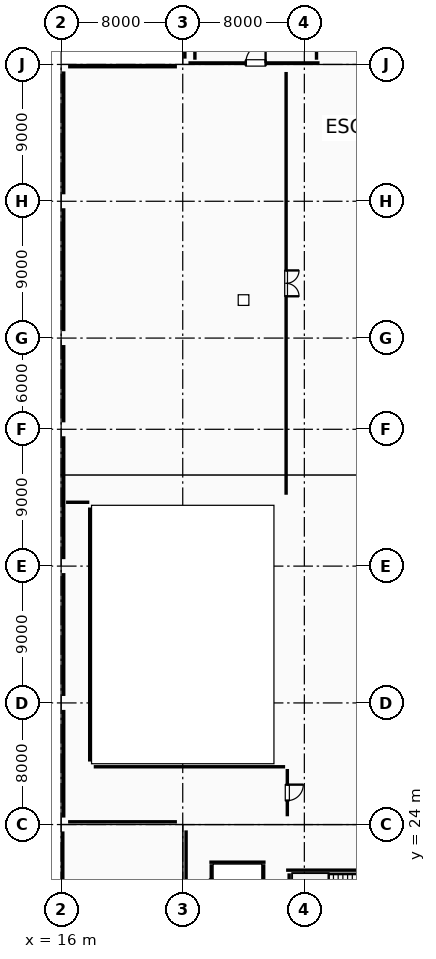
"""IFC4 building model, lengths in metres.
Left out: names, types, materials, properties, quantities, classifications, styles, units other than length and angle.
Written with IfcOpenShell. Run it as: python <this file> out.ifc"""

import sys

from ifc_helpers import new_model, si_unit, direction, frame, frame_2d, origin, origin_2d, place, context, subcontext, project, spatial, rectangle, extrude, element, fill, save


model = new_model("IFC4")
c1 = context("Model", 3, precision=1e-05, world=origin(), true_north=direction((0.0, 1.0)))
c2 = subcontext(c1, "Body", "Model", "MODEL_VIEW")
j1 = project(units=[si_unit("LENGTHUNIT", "METRE"), si_unit("PLANEANGLEUNIT", "RADIAN")], contexts=[c1])
p1 = place(None, origin())
s1 = spatial("IfcSite", under=j1, at=p1, CompositionType="ELEMENT")
p2 = place(p1, origin())
s2 = spatial("IfcBuilding", under=s1, at=p2, CompositionType="ELEMENT")
p3 = place(p2, frame((0.0, 0.0, 15.0)))
s3 = spatial("IfcBuildingStorey", under=s2, at=p3, CompositionType="ELEMENT", Elevation=15.0)
for number, where, z_axis, x_axis in (
    (1, (16.0, 24.0, 0.0), (0.0, 0.0, 1.0), (1.0, 0.0, 0.0)),
    (2, (16.0, 32.0, 0.0), (0.0, 0.0, 1.0), (1.0, 0.0, 0.0)),
    (3, (16.0, 41.0, 0.0), (0.0, 0.0, 1.0), (1.0, 0.0, 0.0)),
    (4, (16.0, 50.0, 0.0), (0.0, 0.0, 1.0), (1.0, 0.0, 0.0)),
    (5, (16.0, 56.0, 0.0), (0.0, 0.0, 1.0), (1.0, 0.0, 0.0)),
    (6, (16.0, 65.0, 0.0), (0.0, 0.0, 1.0), (1.0, 0.0, 0.0)),
    (7, (16.0, 74.0, 0.0), (0.0, 0.0, 1.0), (1.0, 0.0, 0.0)),
):
    element("IfcColumn", number, at=place(p3, frame(where, z_axis=z_axis, x_axis=x_axis)), inside=s3, PredefinedType="COLUMN", context=c2, shape_type="SweptSolid", body=[
        extrude(rectangle(XDim=0.9, YDim=0.9, at=origin_2d()), origin(), (0.0, 0.0, 1.0), 4.8),
    ])
for number, where, z_axis, x_axis in (
    (8, (24.0, 24.0, 0.0), (0.0, 0.0, 1.0), (1.0, 0.0, 0.0)),
    (9, (24.0, 50.0, 0.0), (0.0, 0.0, 1.0), (1.0, 0.0, 0.0)),
    (10, (24.0, 56.0, 0.0), (0.0, 0.0, 1.0), (1.0, 0.0, 0.0)),
    (11, (24.0, 65.0, 0.0), (0.0, 0.0, 1.0), (1.0, 0.0, 0.0)),
    (12, (24.0, 74.0, 0.0), (0.0, 0.0, 1.0), (1.0, 0.0, 0.0)),
    (13, (32.0, 24.0, 0.0), (0.0, 0.0, 1.0), (1.0, 0.0, 0.0)),
    (14, (32.0, 50.0, 0.0), (0.0, 0.0, 1.0), (1.0, 0.0, 0.0)),
    (15, (32.0, 56.0, 0.0), (0.0, 0.0, 1.0), (1.0, 0.0, 0.0)),
    (16, (32.0, 65.0, 0.0), (0.0, 0.0, 1.0), (1.0, 0.0, 0.0)),
):
    element("IfcColumn", number, at=place(p3, frame(where, z_axis=z_axis, x_axis=x_axis)), inside=s3, PredefinedType="COLUMN", context=c2, shape_type="SweptSolid", body=[
        extrude(rectangle(XDim=0.75, YDim=0.75, at=origin_2d()), origin(), (0.0, 0.0, 1.0), 4.8),
    ])
p4 = place(p3, frame((16.458, 73.85, 0.0), z_axis=(0.0, 0.0, 1.0), x_axis=(1.0, 0.0, 0.0)))
e17 = element("IfcWall", 17, at=p4, inside=s3, PredefinedType="ELEMENTEDWALL", context=c2, shape_type="SweptSolid", body=[
    extrude(rectangle(XDim=7.159, YDim=0.26, at=frame_2d((3.58, 0.0))), origin(), (0.0, 0.0, 1.0), 3.985),
])
p5 = place(p4, frame((3.03, 0.0, 0.95)))
e18 = element("IfcOpeningElement", 18, at=p5, cuts=e17, PredefinedType="OPENING", context=c2, shape_type="SweptSolid", body=[
    extrude(rectangle(XDim=1.1, YDim=1.8, at=frame_2d((0.55, 0.9))), frame((0.0, 0.14, 0.0), z_axis=(0.0, -1.0, 0.0), x_axis=(1.0, 0.0, 0.0)), (0.0, 0.0, 1.0), 0.28),
])
p6 = place(p3, frame((24.14, 74.383, 0.0), z_axis=(0.0, 0.0, 1.0), x_axis=(0.0, 1.0, 0.0)))
e19 = element("IfcWall", 19, at=p6, inside=s3, PredefinedType="ELEMENTEDWALL", context=c2, shape_type="SweptSolid", body=[
    extrude(rectangle(XDim=8.284, YDim=0.24, at=frame_2d((4.142, 0.0))), origin(), (0.0, 0.0, 1.0), 3.985),
])
p7 = place(p6, frame((3.592, 0.0, 0.95)))
e20 = element("IfcOpeningElement", 20, at=p7, cuts=e19, PredefinedType="OPENING", context=c2, shape_type="SweptSolid", body=[
    extrude(rectangle(XDim=1.1, YDim=2.1, at=frame_2d((0.55, 1.05))), frame((0.0, 0.13, 0.0), z_axis=(0.0, -1.0, 0.0), x_axis=(1.0, 0.0, 0.0)), (0.0, 0.0, 1.0), 0.26),
])
p8 = place(p3, frame((24.22, 8.21, 0.0), z_axis=(0.0, 0.0, 1.0), x_axis=(0.0, 1.0, 0.0)))
e21 = element("IfcWall", 21, at=p8, inside=s3, PredefinedType="STANDARD", context=c2, shape_type="SweptSolid", body=[
    extrude(rectangle(XDim=15.407, YDim=0.4, at=frame_2d((7.704, 0.0))), origin(), (0.0, 0.0, 1.0), 4.55),
])
p9 = place(p8, frame((7.003, 0.0, 0.95)))
e22 = element("IfcOpeningElement", 22, at=p9, cuts=e21, PredefinedType="OPENING", context=c2, shape_type="SweptSolid", body=[
    extrude(rectangle(XDim=1.4, YDim=2.1, at=frame_2d((0.7, 1.05))), frame((0.0, 0.21, 0.0), z_axis=(0.0, -1.0, 0.0), x_axis=(1.0, 0.0, 0.0)), (0.0, 0.0, 1.0), 0.42),
])
p10 = place(p3, frame((23.617, 24.18, 0.0), z_axis=(0.0, 0.0, 1.0), x_axis=(-1.0, 0.0, 0.0)))
e23 = element("IfcWall", 23, at=p10, inside=s3, PredefinedType="STANDARD", context=c2, shape_type="SweptSolid", body=[
    extrude(rectangle(XDim=7.159, YDim=0.32, at=frame_2d((3.58, 0.0))), origin(), (0.0, 0.0, 1.0), 3.785),
])
p11 = place(p10, frame((2.78, 0.0, 0.95)))
e24 = element("IfcOpeningElement", 24, at=p11, cuts=e23, PredefinedType="OPENING", context=c2, shape_type="SweptSolid", body=[
    extrude(rectangle(XDim=1.6, YDim=1.2, at=frame_2d((0.8, 0.6))), frame((0.0, 0.17, 0.0), z_axis=(0.0, -1.0, 0.0), x_axis=(1.0, 0.0, 0.0)), (0.0, 0.0, 1.0), 0.34),
])
p12 = place(p3, frame((16.17, 24.458, 0.0), z_axis=(0.0, 0.0, 1.0), x_axis=(0.0, 1.0, 0.0)))
e25 = element("IfcWall", 25, at=p12, inside=s3, PredefinedType="STANDARD", context=c2, shape_type="SweptSolid", body=[
    extrude(rectangle(XDim=7.084, YDim=0.3, at=frame_2d((3.542, 0.0))), origin(), (0.0, 0.0, 1.0), 4.085),
])
p13 = place(p12, frame((2.742, 0.0, 0.95)))
e26 = element("IfcOpeningElement", 26, at=p13, cuts=e25, PredefinedType="OPENING", context=c2, shape_type="SweptSolid", body=[
    extrude(rectangle(XDim=1.6, YDim=1.5, at=frame_2d((0.8, 0.75))), frame((0.0, 0.16, 0.0), z_axis=(0.0, -1.0, 0.0), x_axis=(1.0, 0.0, 0.0)), (0.0, 0.0, 1.0), 0.32),
])
p14 = place(p3, frame((16.17, 32.458, 0.0), z_axis=(0.0, 0.0, 1.0), x_axis=(0.0, 1.0, 0.0)))
e27 = element("IfcWall", 27, at=p14, inside=s3, PredefinedType="STANDARD", context=c2, shape_type="SweptSolid", body=[
    extrude(rectangle(XDim=8.084, YDim=0.3, at=frame_2d((4.042, 0.0))), origin(), (0.0, 0.0, 1.0), 3.935),
])
p15 = place(p14, frame((3.242, 0.0, 0.95)))
e28 = element("IfcOpeningElement", 28, at=p15, cuts=e27, PredefinedType="OPENING", context=c2, shape_type="SweptSolid", body=[
    extrude(rectangle(XDim=1.6, YDim=1.8, at=frame_2d((0.8, 0.9))), frame((0.0, 0.16, 0.0), z_axis=(0.0, -1.0, 0.0), x_axis=(1.0, 0.0, 0.0)), (0.0, 0.0, 1.0), 0.32),
])
p16 = place(p3, frame((16.17, 41.458, 0.0), z_axis=(0.0, 0.0, 1.0), x_axis=(0.0, 1.0, 0.0)))
e29 = element("IfcWall", 29, at=p16, inside=s3, PredefinedType="STANDARD", context=c2, shape_type="SweptSolid", body=[
    extrude(rectangle(XDim=8.084, YDim=0.3, at=frame_2d((4.042, 0.0))), origin(), (0.0, 0.0, 1.0), 3.985),
])
p17 = place(p3, frame((16.17, 50.458, 0.0), z_axis=(0.0, 0.0, 1.0), x_axis=(0.0, 1.0, 0.0)))
e30 = element("IfcWall", 30, at=p17, inside=s3, PredefinedType="STANDARD", context=c2, shape_type="SweptSolid", body=[
    extrude(rectangle(XDim=5.084, YDim=0.3, at=frame_2d((2.542, 0.0))), origin(), (0.0, 0.0, 1.0), 4.035),
])
p18 = place(p17, frame((1.742, 0.0, 0.95)))
e31 = element("IfcOpeningElement", 31, at=p18, cuts=e30, PredefinedType="OPENING", context=c2, shape_type="SweptSolid", body=[
    extrude(rectangle(XDim=1.6, YDim=2.1, at=frame_2d((0.8, 1.05))), frame((0.0, 0.16, 0.0), z_axis=(0.0, -1.0, 0.0), x_axis=(1.0, 0.0, 0.0)), (0.0, 0.0, 1.0), 0.32),
])
p19 = place(p3, frame((16.17, 56.458, 0.0), z_axis=(0.0, 0.0, 1.0), x_axis=(0.0, 1.0, 0.0)))
e32 = element("IfcWall", 32, at=p19, inside=s3, PredefinedType="STANDARD", context=c2, shape_type="SweptSolid", body=[
    extrude(rectangle(XDim=8.084, YDim=0.3, at=frame_2d((4.042, 0.0))), origin(), (0.0, 0.0, 1.0), 4.085),
])
p20 = place(p19, frame((3.142, 0.0, 0.95)))
e33 = element("IfcOpeningElement", 33, at=p20, cuts=e32, PredefinedType="OPENING", context=c2, shape_type="SweptSolid", body=[
    extrude(rectangle(XDim=1.8, YDim=1.2, at=frame_2d((0.9, 0.6))), frame((0.0, 0.16, 0.0), z_axis=(0.0, -1.0, 0.0), x_axis=(1.0, 0.0, 0.0)), (0.0, 0.0, 1.0), 0.32),
])
p21 = place(p3, frame((16.17, 65.458, 0.0), z_axis=(0.0, 0.0, 1.0), x_axis=(0.0, 1.0, 0.0)))
e34 = element("IfcWall", 34, at=p21, inside=s3, PredefinedType="STANDARD", context=c2, shape_type="SweptSolid", body=[
    extrude(rectangle(XDim=8.084, YDim=0.3, at=frame_2d((4.042, 0.0))), origin(), (0.0, 0.0, 1.0), 4.135),
])
p22 = place(p21, frame((3.142, 0.0, 0.95)))
e35 = element("IfcOpeningElement", 35, at=p22, cuts=e34, PredefinedType="OPENING", context=c2, shape_type="SweptSolid", body=[
    extrude(rectangle(XDim=1.8, YDim=1.5, at=frame_2d((0.9, 0.75))), frame((0.0, 0.16, 0.0), z_axis=(0.0, -1.0, 0.0), x_axis=(1.0, 0.0, 0.0)), (0.0, 0.0, 1.0), 0.32),
])
p23 = place(p3, frame((16.11, 8.13, 0.0), z_axis=(0.0, 0.0, 1.0), x_axis=(0.0, 1.0, 0.0)))
e36 = element("IfcWall", 36, at=p23, inside=s3, PredefinedType="PARAPET", context=c2, shape_type="SweptSolid", body=[
    extrude(rectangle(XDim=15.42, YDim=0.18, at=frame_2d((7.71, 0.0))), origin(), (0.0, 0.0, 1.0), 1.15),
])
p24 = place(p3, frame((39.2, 21.0, 0.0), z_axis=(0.0, 0.0, 1.0), x_axis=(-1.0, 0.0, 0.0)))
e37 = element("IfcWall", 37, at=p24, inside=s3, PredefinedType="SHEAR", context=c2, shape_type="SweptSolid", body=[
    extrude(rectangle(XDim=8.4, YDim=0.4, at=frame_2d((4.2, 0.0))), origin(), (0.0, 0.0, 1.0), 4.55),
])
p25 = place(p3, frame((31.0, 20.79, 0.0), z_axis=(0.0, 0.0, 1.0), x_axis=(0.0, -1.0, 0.0)))
e38 = element("IfcWall", 38, at=p25, inside=s3, PredefinedType="SHEAR", context=c2, shape_type="SweptSolid", body=[
    extrude(rectangle(XDim=8.38, YDim=0.4, at=frame_2d((4.19, 0.0))), origin(), (0.0, 0.0, 1.0), 4.55),
])
p26 = place(p3, frame((29.45, 21.525, 0.0), z_axis=(0.0, 0.0, 1.0), x_axis=(-1.0, 0.0, 0.0)))
e39 = element("IfcWall", 39, at=p26, inside=s3, PredefinedType="STANDARD", context=c2, shape_type="SweptSolid", body=[
    extrude(rectangle(XDim=3.7, YDim=0.25, at=frame_2d((1.85, 0.0))), origin(), (0.0, 0.0, 1.0), 4.54),
])
p27 = place(p3, frame((29.325, 17.01, 0.0), z_axis=(0.0, 0.0, 1.0), x_axis=(0.0, 1.0, 0.0)))
e40 = element("IfcWall", 40, at=p27, inside=s3, PredefinedType="STANDARD", context=c2, shape_type="SweptSolid", body=[
    extrude(rectangle(XDim=4.38, YDim=0.25, at=frame_2d((2.19, 0.0))), origin(), (0.0, 0.0, 1.0), 4.54),
])
p28 = place(p3, frame((25.875, 21.39, 0.0), z_axis=(0.0, 0.0, 1.0), x_axis=(0.0, -1.0, 0.0)))
e41 = element("IfcWall", 41, at=p28, inside=s3, PredefinedType="STANDARD", context=c2, shape_type="SweptSolid", body=[
    extrude(rectangle(XDim=4.38, YDim=0.25, at=frame_2d((2.19, 0.0))), origin(), (0.0, 0.0, 1.0), 4.54),
])
p29 = place(p28, frame((0.99, 0.0, 0.0)))
e42 = element("IfcOpeningElement", 42, at=p29, cuts=e41, PredefinedType="OPENING", context=c2, shape_type="SweptSolid", body=[
    extrude(rectangle(XDim=2.4, YDim=2.55, at=frame_2d((1.2, 1.275))), frame((0.0, 0.135, 0.0), z_axis=(0.0, -1.0, 0.0), x_axis=(1.0, 0.0, 0.0)), (0.0, 0.0, 1.0), 0.27),
])
p30 = place(p3, frame((24.374, 74.1, 0.0), z_axis=(0.0, 0.0, 1.0), x_axis=(1.0, 0.0, 0.0)))
e43 = element("IfcWall", 43, at=p30, inside=s3, PredefinedType="SHEAR", context=c2, shape_type="SweptSolid", body=[
    extrude(rectangle(XDim=8.626, YDim=0.4, at=frame_2d((4.313, 0.0))), origin(), (0.0, 0.0, 1.0), 4.55),
])
p31 = place(p30, frame((3.776, 0.0, 0.0)))
e44 = element("IfcOpeningElement", 44, at=p31, cuts=e43, PredefinedType="OPENING", context=c2, shape_type="SweptSolid", body=[
    extrude(rectangle(XDim=1.3, YDim=2.15, at=frame_2d((0.65, 1.075))), frame((0.0, 0.21, 0.0), z_axis=(0.0, -1.0, 0.0), x_axis=(1.0, 0.0, 0.0)), (0.0, 0.0, 1.0), 0.42),
])
for number, where, z_axis, x_axis in (
    (45, (32.8, 74.31, 0.0), (0.0, 0.0, 1.0), (0.0, 1.0, 0.0)),
    (46, (24.8, 82.69, 0.0), (0.0, 0.0, 1.0), (0.0, -1.0, 0.0)),
):
    element("IfcWall", number, at=place(p3, frame(where, z_axis=z_axis, x_axis=x_axis)), inside=s3, PredefinedType="SHEAR", context=c2, shape_type="SweptSolid", body=[
        extrude(rectangle(XDim=8.38, YDim=0.4, at=frame_2d((4.19, 0.0))), origin(), (0.0, 0.0, 1.0), 4.55),
    ])
p32 = place(p3, frame((17.88, 44.855, 0.0), z_axis=(0.0, 0.0, 1.0), x_axis=(0.0, -1.0, 0.0)))
e47 = element("IfcWall", 47, at=p32, inside=s3, PredefinedType="PARTITIONING", context=c2, shape_type="SweptSolid", body=[
    extrude(rectangle(XDim=16.71, YDim=0.25, at=frame_2d((8.355, 0.0))), origin(), (0.0, 0.0, 1.0), 4.54),
])
p33 = place(p3, frame((18.145, 27.8, 0.0), z_axis=(0.0, 0.0, 1.0), x_axis=(1.0, 0.0, 0.0)))
e48 = element("IfcWall", 48, at=p33, inside=s3, PredefinedType="PARTITIONING", context=c2, shape_type="SweptSolid", body=[
    extrude(rectangle(XDim=12.59, YDim=0.25, at=frame_2d((6.295, 0.0))), origin(), (0.0, 0.0, 1.0), 4.54),
])
p34 = place(p3, frame((30.88, 27.655, 0.0), z_axis=(0.0, 0.0, 1.0), x_axis=(0.0, -1.0, 0.0)))
e49 = element("IfcWall", 49, at=p34, inside=s3, PredefinedType="PARTITIONING", context=c2, shape_type="SweptSolid", body=[
    extrude(rectangle(XDim=3.11, YDim=0.25, at=frame_2d((1.555, 0.0))), origin(), (0.0, 0.0, 1.0), 4.54),
])
p35 = place(p34, frame((1.03, 0.0, 0.0)))
e50 = element("IfcOpeningElement", 50, at=p35, cuts=e49, PredefinedType="OPENING", context=c2, shape_type="SweptSolid", body=[
    extrude(rectangle(XDim=1.05, YDim=2.15, at=frame_2d((0.525, 1.075))), frame((0.0, 0.135, 0.0), z_axis=(0.0, -1.0, 0.0), x_axis=(1.0, 0.0, 0.0)), (0.0, 0.0, 1.0), 0.27),
])
p36 = place(p3, frame((16.324, 45.2, 0.0), z_axis=(0.0, 0.0, 1.0), x_axis=(1.0, 0.0, 0.0)))
e51 = element("IfcWall", 51, at=p36, inside=s3, PredefinedType="PARTITIONING", context=c2, shape_type="SweptSolid", body=[
    extrude(rectangle(XDim=1.531, YDim=0.25, at=frame_2d((0.766, 0.0))), origin(), (0.0, 0.0, 1.0), 4.54),
])
p37 = place(p3, frame((30.8, 73.505, 0.0), z_axis=(0.0, 0.0, 1.0), x_axis=(0.0, -1.0, 0.0)))
e52 = element("IfcWall", 52, at=p37, inside=s3, PredefinedType="PARTITIONING", context=c2, shape_type="SweptSolid", body=[
    extrude(rectangle(XDim=27.81, YDim=0.15, at=frame_2d((13.905, 0.0))), origin(), (0.0, 0.0, 1.0), 4.54),
])
p38 = place(p37, frame((13.055, 0.0, 0.0)))
e53 = element("IfcOpeningElement", 53, at=p38, cuts=e52, PredefinedType="OPENING", context=c2, shape_type="SweptSolid", body=[
    extrude(rectangle(XDim=1.7, YDim=2.25, at=frame_2d((0.85, 1.125))), frame((0.0, 0.085, 0.0), z_axis=(0.0, -1.0, 0.0), x_axis=(1.0, 0.0, 0.0)), (0.0, 0.0, 1.0), 0.17),
])
p39 = place(p5, origin())
e54 = element("IfcWindow", 54, at=p39, inside=s3, PartitioningType="SINGLE_PANEL", PredefinedType="WINDOW", context=c2, shape_type="SweptSolid", body=[
    extrude(rectangle(XDim=1.1, YDim=1.8, at=frame_2d((0.55, 0.9))), frame((0.0, 0.03, 0.0), z_axis=(0.0, -1.0, 0.0), x_axis=(1.0, 0.0, 0.0)), (0.0, 0.0, 1.0), 0.06),
])
fill(e18, e54)
p40 = place(p11, origin())
e55 = element("IfcWindow", 55, at=p40, inside=s3, PartitioningType="SINGLE_PANEL", PredefinedType="WINDOW", context=c2, shape_type="SweptSolid", body=[
    extrude(rectangle(XDim=1.6, YDim=1.2, at=frame_2d((0.8, 0.6))), frame((0.0, 0.03, 0.0), z_axis=(0.0, -1.0, 0.0), x_axis=(1.0, 0.0, 0.0)), (0.0, 0.0, 1.0), 0.06),
])
fill(e24, e55)
p41 = place(p13, origin())
e56 = element("IfcWindow", 56, at=p41, inside=s3, PartitioningType="SINGLE_PANEL", PredefinedType="WINDOW", context=c2, shape_type="SweptSolid", body=[
    extrude(rectangle(XDim=1.6, YDim=1.5, at=frame_2d((0.8, 0.75))), frame((0.0, 0.03, 0.0), z_axis=(0.0, -1.0, 0.0), x_axis=(1.0, 0.0, 0.0)), (0.0, 0.0, 1.0), 0.06),
])
fill(e26, e56)
p42 = place(p15, origin())
e57 = element("IfcWindow", 57, at=p42, inside=s3, PartitioningType="SINGLE_PANEL", PredefinedType="WINDOW", context=c2, shape_type="SweptSolid", body=[
    extrude(rectangle(XDim=1.6, YDim=1.8, at=frame_2d((0.8, 0.9))), frame((0.0, 0.03, 0.0), z_axis=(0.0, -1.0, 0.0), x_axis=(1.0, 0.0, 0.0)), (0.0, 0.0, 1.0), 0.06),
])
fill(e28, e57)
p43 = place(p18, origin())
e58 = element("IfcWindow", 58, at=p43, inside=s3, PartitioningType="SINGLE_PANEL", PredefinedType="WINDOW", context=c2, shape_type="SweptSolid", body=[
    extrude(rectangle(XDim=1.6, YDim=2.1, at=frame_2d((0.8, 1.05))), frame((0.0, 0.03, 0.0), z_axis=(0.0, -1.0, 0.0), x_axis=(1.0, 0.0, 0.0)), (0.0, 0.0, 1.0), 0.06),
])
fill(e31, e58)
p44 = place(p20, origin())
e59 = element("IfcWindow", 59, at=p44, inside=s3, PartitioningType="SINGLE_PANEL", PredefinedType="WINDOW", context=c2, shape_type="SweptSolid", body=[
    extrude(rectangle(XDim=1.8, YDim=1.2, at=frame_2d((0.9, 0.6))), frame((0.0, 0.03, 0.0), z_axis=(0.0, -1.0, 0.0), x_axis=(1.0, 0.0, 0.0)), (0.0, 0.0, 1.0), 0.06),
])
fill(e33, e59)
p45 = place(p22, origin())
e60 = element("IfcWindow", 60, at=p45, inside=s3, PartitioningType="SINGLE_PANEL", PredefinedType="WINDOW", context=c2, shape_type="SweptSolid", body=[
    extrude(rectangle(XDim=1.8, YDim=1.5, at=frame_2d((0.9, 0.75))), frame((0.0, 0.03, 0.0), z_axis=(0.0, -1.0, 0.0), x_axis=(1.0, 0.0, 0.0)), (0.0, 0.0, 1.0), 0.06),
])
fill(e35, e60)
p46 = place(p31, origin())
e61 = element("IfcDoor", 61, at=p46, inside=s3, OperationType="SINGLE_SWING_RIGHT", PredefinedType="DOOR", context=c2, shape_type="SweptSolid", body=[
    extrude(rectangle(XDim=1.3, YDim=2.15, at=frame_2d((0.65, 1.075))), frame((0.0, 0.025, 0.0), z_axis=(0.0, -1.0, 0.0), x_axis=(1.0, 0.0, 0.0)), (0.0, 0.0, 1.0), 0.05),
])
fill(e44, e61)
p47 = place(p35, origin())
e62 = element("IfcDoor", 62, at=p47, inside=s3, OperationType="SINGLE_SWING_LEFT", PredefinedType="DOOR", context=c2, shape_type="SweptSolid", body=[
    extrude(rectangle(XDim=1.05, YDim=2.15, at=frame_2d((0.525, 1.075))), frame((0.0, 0.025, 0.0), z_axis=(0.0, -1.0, 0.0), x_axis=(1.0, 0.0, 0.0)), (0.0, 0.0, 1.0), 0.05),
])
fill(e50, e62)
p48 = place(p38, origin())
e63 = element("IfcDoor", 63, at=p48, inside=s3, OperationType="DOUBLE_DOOR_SINGLE_SWING", PredefinedType="DOOR", context=c2, shape_type="SweptSolid", body=[
    extrude(rectangle(XDim=1.7, YDim=2.25, at=frame_2d((0.85, 1.125))), frame((0.0, 0.025, 0.0), z_axis=(0.0, -1.0, 0.0), x_axis=(1.0, 0.0, 0.0)), (0.0, 0.0, 1.0), 0.05),
])
fill(e53, e63)
save(model, sys.argv[1])
